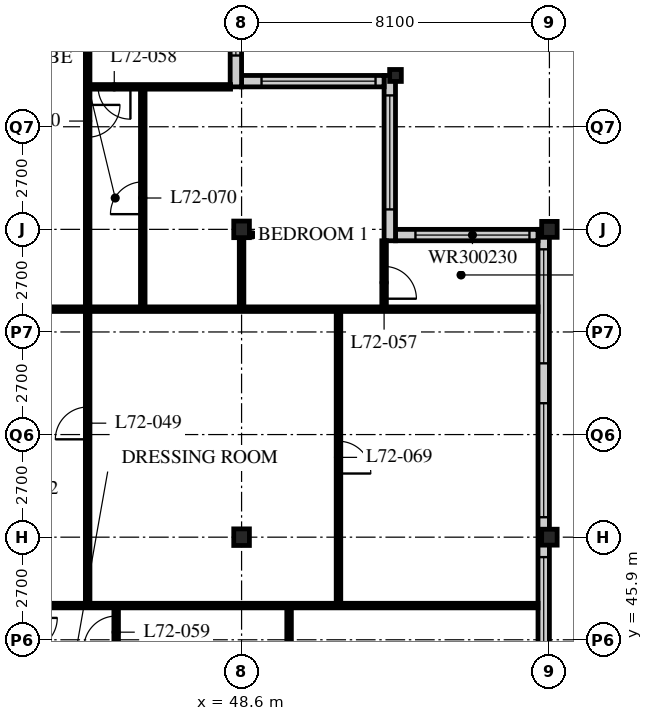
"""IFC4 building model, lengths in metres.
Left out: names, types, materials, properties, quantities, classifications, styles, units other than length and angle.
Written with IfcOpenShell. Run it as: python <this file> out.ifc"""

import sys

from ifc_helpers import new_model, si_unit, direction, frame, frame_2d, origin, origin_2d, place, context, subcontext, project, spatial, rectangle, i_section, extrude, element, fill, save


model = new_model("IFC4")
c1 = context("Model", 3, precision=1e-05, world=origin(), true_north=direction((0.0, 1.0)))
c2 = subcontext(c1, "Body", "Model", "MODEL_VIEW")
j1 = project(units=[si_unit("LENGTHUNIT", "METRE"), si_unit("PLANEANGLEUNIT", "RADIAN")], contexts=[c1])
p1 = place(None, origin())
s1 = spatial("IfcSite", under=j1, at=p1, CompositionType="ELEMENT")
p2 = place(p1, origin())
s2 = spatial("IfcBuilding", under=s1, at=p2, CompositionType="ELEMENT")
p3 = place(p2, frame((0.0, 0.0, 281.4)))
s3 = spatial("IfcBuildingStorey", under=s2, at=p3, CompositionType="ELEMENT", Elevation=281.4)
for number, where, z_axis, x_axis in (
    (1, (48.6, 48.6, 0.0), (0.0, 0.0, 1.0), (1.0, 0.0, 0.0)),
    (2, (48.6, 56.7, 0.0), (0.0, 0.0, 1.0), (1.0, 0.0, 0.0)),
):
    element("IfcColumn", number, at=place(p3, frame(where, z_axis=z_axis, x_axis=x_axis)), inside=s3, PredefinedType="COLUMN", context=c2, shape_type="SweptSolid", body=[
        extrude(i_section(OverallWidth=0.412, OverallDepth=0.437, WebThickness=0.036, FlangeThickness=0.058, FilletRadius=0.015, at=origin_2d()), origin(), (0.0, 0.0, 1.0), 3.9),
    ])
p4 = place(p3, frame((52.65, 60.75, 0.0), z_axis=(0.0, 0.0, 1.0), x_axis=(1.0, 0.0, 0.0)))
e3 = element("IfcColumn", 3, at=p4, inside=s3, PredefinedType="COLUMN", context=c2, shape_type="SweptSolid", body=[
    extrude(i_section(OverallWidth=0.307, OverallDepth=0.314, WebThickness=0.012, FlangeThickness=0.019, FilletRadius=0.015, at=origin_2d()), origin(), (0.0, 0.0, 1.0), 3.9),
])
for number, where, z_axis, x_axis in (
    (4, (56.7, 48.6, 0.0), (0.0, 0.0, 1.0), (1.0, 0.0, 0.0)),
    (5, (56.7, 56.7, 0.0), (0.0, 0.0, 1.0), (1.0, 0.0, 0.0)),
):
    element("IfcColumn", number, at=place(p3, frame(where, z_axis=z_axis, x_axis=x_axis)), inside=s3, PredefinedType="COLUMN", context=c2, shape_type="SweptSolid", body=[
        extrude(i_section(OverallWidth=0.407, OverallDepth=0.419, WebThickness=0.031, FlangeThickness=0.049, FilletRadius=0.015, at=origin_2d()), origin(), (0.0, 0.0, 1.0), 3.9),
    ])
p5 = place(p3, frame((56.55, 24.6, 0.0), z_axis=(0.0, 0.0, 1.0), x_axis=(0.0, 1.0, 0.0)))
e6 = element("IfcWall", 6, at=p5, inside=s3, PredefinedType="SOLIDWALL", context=c2, shape_type="SweptSolid", body=[
    extrude(rectangle(XDim=32.1, YDim=0.3, at=frame_2d((16.05, 0.0))), origin(), (0.0, 0.0, 1.0), 3.69),
])
p6 = place(p5, frame((0.225, 0.0, 0.6)))
e7 = element("IfcOpeningElement", 7, at=p6, cuts=e6, PredefinedType="OPENING", context=c2, shape_type="SweptSolid", body=[
    extrude(rectangle(XDim=3.0, YDim=2.4, at=frame_2d((1.5, 1.2))), frame((0.0, 0.16, 0.0), z_axis=(0.0, -1.0, 0.0), x_axis=(1.0, 0.0, 0.0)), (0.0, 0.0, 1.0), 0.32),
])
p7 = place(p5, frame((4.275, 0.0, 0.6)))
e8 = element("IfcOpeningElement", 8, at=p7, cuts=e6, PredefinedType="OPENING", context=c2, shape_type="SweptSolid", body=[
    extrude(rectangle(XDim=3.0, YDim=2.4, at=frame_2d((1.5, 1.2))), frame((0.0, 0.16, 0.0), z_axis=(0.0, -1.0, 0.0), x_axis=(1.0, 0.0, 0.0)), (0.0, 0.0, 1.0), 0.32),
])
p8 = place(p5, frame((8.325, 0.0, 0.6)))
e9 = element("IfcOpeningElement", 9, at=p8, cuts=e6, PredefinedType="OPENING", context=c2, shape_type="SweptSolid", body=[
    extrude(rectangle(XDim=3.0, YDim=2.4, at=frame_2d((1.5, 1.2))), frame((0.0, 0.16, 0.0), z_axis=(0.0, -1.0, 0.0), x_axis=(1.0, 0.0, 0.0)), (0.0, 0.0, 1.0), 0.32),
])
p9 = place(p5, frame((12.375, 0.0, 0.6)))
e10 = element("IfcOpeningElement", 10, at=p9, cuts=e6, PredefinedType="OPENING", context=c2, shape_type="SweptSolid", body=[
    extrude(rectangle(XDim=3.0, YDim=2.4, at=frame_2d((1.5, 1.2))), frame((0.0, 0.16, 0.0), z_axis=(0.0, -1.0, 0.0), x_axis=(1.0, 0.0, 0.0)), (0.0, 0.0, 1.0), 0.32),
])
p10 = place(p5, frame((16.425, 0.0, 0.6)))
e11 = element("IfcOpeningElement", 11, at=p10, cuts=e6, PredefinedType="OPENING", context=c2, shape_type="SweptSolid", body=[
    extrude(rectangle(XDim=3.0, YDim=2.4, at=frame_2d((1.5, 1.2))), frame((0.0, 0.16, 0.0), z_axis=(0.0, -1.0, 0.0), x_axis=(1.0, 0.0, 0.0)), (0.0, 0.0, 1.0), 0.32),
])
p11 = place(p5, frame((20.475, 0.0, 0.6)))
e12 = element("IfcOpeningElement", 12, at=p11, cuts=e6, PredefinedType="OPENING", context=c2, shape_type="SweptSolid", body=[
    extrude(rectangle(XDim=3.0, YDim=2.4, at=frame_2d((1.5, 1.2))), frame((0.0, 0.16, 0.0), z_axis=(0.0, -1.0, 0.0), x_axis=(1.0, 0.0, 0.0)), (0.0, 0.0, 1.0), 0.32),
])
p12 = place(p5, frame((24.525, 0.0, 0.6)))
e13 = element("IfcOpeningElement", 13, at=p12, cuts=e6, PredefinedType="OPENING", context=c2, shape_type="SweptSolid", body=[
    extrude(rectangle(XDim=3.0, YDim=2.4, at=frame_2d((1.5, 1.2))), frame((0.0, 0.16, 0.0), z_axis=(0.0, -1.0, 0.0), x_axis=(1.0, 0.0, 0.0)), (0.0, 0.0, 1.0), 0.32),
])
p13 = place(p5, frame((28.575, 0.0, 0.6)))
e14 = element("IfcOpeningElement", 14, at=p13, cuts=e6, PredefinedType="OPENING", context=c2, shape_type="SweptSolid", body=[
    extrude(rectangle(XDim=3.0, YDim=2.4, at=frame_2d((1.5, 1.2))), frame((0.0, 0.16, 0.0), z_axis=(0.0, -1.0, 0.0), x_axis=(1.0, 0.0, 0.0)), (0.0, 0.0, 1.0), 0.32),
])
p14 = place(p3, frame((56.4, 56.55, 0.0), z_axis=(0.0, 0.0, 1.0), x_axis=(-1.0, 0.0, 0.0)))
e15 = element("IfcWall", 15, at=p14, inside=s3, PredefinedType="SOLIDWALL", context=c2, shape_type="SweptSolid", body=[
    extrude(rectangle(XDim=3.75, YDim=0.3, at=frame_2d((1.875, 0.0))), origin(), (0.0, 0.0, 1.0), 3.69),
])
p15 = place(p14, frame((0.225, 0.0, 0.6)))
e16 = element("IfcOpeningElement", 16, at=p15, cuts=e15, PredefinedType="OPENING", context=c2, shape_type="SweptSolid", body=[
    extrude(rectangle(XDim=3.0, YDim=2.3, at=frame_2d((1.5, 1.15))), frame((0.0, 0.16, 0.0), z_axis=(0.0, -1.0, 0.0), x_axis=(1.0, 0.0, 0.0)), (0.0, 0.0, 1.0), 0.32),
])
p16 = place(p3, frame((52.5, 56.4, 0.0), z_axis=(0.0, 0.0, 1.0), x_axis=(0.0, 1.0, 0.0)))
e17 = element("IfcWall", 17, at=p16, inside=s3, PredefinedType="SOLIDWALL", context=c2, shape_type="SweptSolid", body=[
    extrude(rectangle(XDim=4.35, YDim=0.3, at=frame_2d((2.175, 0.0))), origin(), (0.0, 0.0, 1.0), 3.69),
])
p17 = place(p16, frame((0.825, 0.0, 0.6)))
e18 = element("IfcOpeningElement", 18, at=p17, cuts=e17, PredefinedType="OPENING", context=c2, shape_type="SweptSolid", body=[
    extrude(rectangle(XDim=3.0, YDim=2.3, at=frame_2d((1.5, 1.15))), frame((0.0, 0.16, 0.0), z_axis=(0.0, -1.0, 0.0), x_axis=(1.0, 0.0, 0.0)), (0.0, 0.0, 1.0), 0.32),
])
p18 = place(p3, frame((52.35, 60.6, 0.0), z_axis=(0.0, 0.0, 1.0), x_axis=(-1.0, 0.0, 0.0)))
e19 = element("IfcWall", 19, at=p18, inside=s3, PredefinedType="SOLIDWALL", context=c2, shape_type="SweptSolid", body=[
    extrude(rectangle(XDim=3.75, YDim=0.3, at=frame_2d((1.875, 0.0))), origin(), (0.0, 0.0, 1.0), 3.69),
])
p19 = place(p18, frame((0.225, 0.0, 0.6)))
e20 = element("IfcOpeningElement", 20, at=p19, cuts=e19, PredefinedType="OPENING", context=c2, shape_type="SweptSolid", body=[
    extrude(rectangle(XDim=3.0, YDim=2.3, at=frame_2d((1.5, 1.15))), frame((0.0, 0.16, 0.0), z_axis=(0.0, -1.0, 0.0), x_axis=(1.0, 0.0, 0.0)), (0.0, 0.0, 1.0), 0.32),
])
p20 = place(p3, frame((48.45, 60.45, 0.0), z_axis=(0.0, 0.0, 1.0), x_axis=(0.0, 1.0, 0.0)))
e21 = element("IfcWall", 21, at=p20, inside=s3, PredefinedType="SOLIDWALL", context=c2, shape_type="SweptSolid", body=[
    extrude(rectangle(XDim=4.35, YDim=0.3, at=frame_2d((2.175, 0.0))), origin(), (0.0, 0.0, 1.0), 3.69),
])
p21 = place(p20, frame((0.825, 0.0, 0.6)))
e22 = element("IfcOpeningElement", 22, at=p21, cuts=e21, PredefinedType="OPENING", context=c2, shape_type="SweptSolid", body=[
    extrude(rectangle(XDim=3.0, YDim=2.3, at=frame_2d((1.5, 1.15))), frame((0.0, 0.16, 0.0), z_axis=(0.0, -1.0, 0.0), x_axis=(1.0, 0.0, 0.0)), (0.0, 0.0, 1.0), 0.32),
])
p22 = place(p3, frame((42.9, 46.8, 0.0), z_axis=(0.0, 0.0, 1.0), x_axis=(1.0, 0.0, 0.0)))
e23 = element("IfcWall", 23, at=p22, inside=s3, PredefinedType="PARTITIONING", context=c2, shape_type="SweptSolid", body=[
    extrude(rectangle(XDim=13.5, YDim=0.12, at=frame_2d((6.75, 0.0))), origin(), (0.0, 0.0, 1.0), 3.69),
])
p23 = place(p3, frame((36.45, 54.6, 0.0), z_axis=(0.0, 0.0, 1.0), x_axis=(1.0, 0.0, 0.0)))
e24 = element("IfcWall", 24, at=p23, inside=s3, PredefinedType="PARTITIONING", context=c2, shape_type="SweptSolid", body=[
    extrude(rectangle(XDim=19.95, YDim=0.12, at=frame_2d((9.975, 0.0))), origin(), (0.0, 0.0, 1.0), 3.69),
])
p24 = place(p23, frame((1.675, 0.0, 0.0)))
e25 = element("IfcOpeningElement", 25, at=p24, cuts=e24, PredefinedType="OPENING", context=c2, shape_type="SweptSolid", body=[
    extrude(rectangle(XDim=0.85, YDim=2.1, at=frame_2d((0.425, 1.05))), frame((0.0, 0.07, 0.0), z_axis=(0.0, -1.0, 0.0), x_axis=(1.0, 0.0, 0.0)), (0.0, 0.0, 1.0), 0.14),
])
p25 = place(p3, frame((44.55, 64.5, 0.0), z_axis=(0.0, 0.0, 1.0), x_axis=(0.0, -1.0, 0.0)))
e26 = element("IfcWall", 26, at=p25, inside=s3, PredefinedType="PARTITIONING", context=c2, shape_type="SweptSolid", body=[
    extrude(rectangle(XDim=17.7, YDim=0.12, at=frame_2d((8.85, 0.0))), origin(), (0.0, 0.0, 1.0), 3.69),
])
p26 = place(p25, frame((12.475, 0.0, 0.0)))
e27 = element("IfcOpeningElement", 27, at=p26, cuts=e26, PredefinedType="OPENING", context=c2, shape_type="SweptSolid", body=[
    extrude(rectangle(XDim=0.85, YDim=2.1, at=frame_2d((0.425, 1.05))), frame((0.0, 0.07, 0.0), z_axis=(0.0, -1.0, 0.0), x_axis=(1.0, 0.0, 0.0)), (0.0, 0.0, 1.0), 0.14),
])
p27 = place(p25, frame((4.525, 0.0, 0.0)))
e28 = element("IfcOpeningElement", 28, at=p27, cuts=e26, PredefinedType="OPENING", context=c2, shape_type="SweptSolid", body=[
    extrude(rectangle(XDim=0.85, YDim=2.1, at=frame_2d((0.425, 1.05))), frame((0.0, 0.07, 0.0), z_axis=(0.0, -1.0, 0.0), x_axis=(1.0, 0.0, 0.0)), (0.0, 0.0, 1.0), 0.14),
])
p28 = place(p3, frame((52.35, 54.6, 0.0), z_axis=(0.0, 0.0, 1.0), x_axis=(0.0, 1.0, 0.0)))
e29 = element("IfcWall", 29, at=p28, inside=s3, PredefinedType="PARTITIONING", context=c2, shape_type="SweptSolid", body=[
    extrude(rectangle(XDim=1.8, YDim=0.12, at=frame_2d((0.9, 0.0))), origin(), (0.0, 0.0, 1.0), 3.69),
])
p29 = place(p28, frame((0.275, 0.0, 0.0)))
e30 = element("IfcOpeningElement", 30, at=p29, cuts=e29, PredefinedType="OPENING", context=c2, shape_type="SweptSolid", body=[
    extrude(rectangle(XDim=0.85, YDim=2.1, at=frame_2d((0.425, 1.05))), frame((0.0, 0.07, 0.0), z_axis=(0.0, -1.0, 0.0), x_axis=(1.0, 0.0, 0.0)), (0.0, 0.0, 1.0), 0.14),
])
p30 = place(p3, frame((48.31, 60.45, 0.0), z_axis=(0.0, 0.0, 1.0), x_axis=(-1.0, 0.0, 0.0)))
e31 = element("IfcWall", 31, at=p30, inside=s3, PredefinedType="PARTITIONING", context=c2, shape_type="SweptSolid", body=[
    extrude(rectangle(XDim=3.76, YDim=0.12, at=frame_2d((1.88, 0.0))), origin(), (0.0, 0.0, 1.0), 3.69),
])
p31 = place(p30, frame((2.635, 0.0, 0.0)))
e32 = element("IfcOpeningElement", 32, at=p31, cuts=e31, PredefinedType="OPENING", context=c2, shape_type="SweptSolid", body=[
    extrude(rectangle(XDim=0.85, YDim=2.1, at=frame_2d((0.425, 1.05))), frame((0.0, 0.07, 0.0), z_axis=(0.0, -1.0, 0.0), x_axis=(1.0, 0.0, 0.0)), (0.0, 0.0, 1.0), 0.14),
])
p32 = place(p3, frame((45.3, 46.8, 0.0), z_axis=(0.0, 0.0, 1.0), x_axis=(0.0, -1.0, 0.0)))
e33 = element("IfcWall", 33, at=p32, inside=s3, PredefinedType="PARTITIONING", context=c2, shape_type="SweptSolid", body=[
    extrude(rectangle(XDim=4.01, YDim=0.12, at=frame_2d((2.005, 0.0))), origin(), (0.0, 0.0, 1.0), 3.69),
])
p33 = place(p32, frame((0.275, 0.0, 0.0)))
e34 = element("IfcOpeningElement", 34, at=p33, cuts=e33, PredefinedType="OPENING", context=c2, shape_type="SweptSolid", body=[
    extrude(rectangle(XDim=0.85, YDim=2.1, at=frame_2d((0.425, 1.05))), frame((0.0, 0.07, 0.0), z_axis=(0.0, -1.0, 0.0), x_axis=(1.0, 0.0, 0.0)), (0.0, 0.0, 1.0), 0.14),
])
p34 = place(p3, frame((51.15, 46.8, 0.0), z_axis=(0.0, 0.0, 1.0), x_axis=(0.0, 1.0, 0.0)))
e35 = element("IfcWall", 35, at=p34, inside=s3, PredefinedType="PARTITIONING", context=c2, shape_type="SweptSolid", body=[
    extrude(rectangle(XDim=7.8, YDim=0.12, at=frame_2d((3.9, 0.0))), origin(), (0.0, 0.0, 1.0), 3.69),
])
p35 = place(p34, frame((3.475, 0.0, 0.0)))
e36 = element("IfcOpeningElement", 36, at=p35, cuts=e35, PredefinedType="OPENING", context=c2, shape_type="SweptSolid", body=[
    extrude(rectangle(XDim=0.85, YDim=2.1, at=frame_2d((0.425, 1.05))), frame((0.0, 0.07, 0.0), z_axis=(0.0, -1.0, 0.0), x_axis=(1.0, 0.0, 0.0)), (0.0, 0.0, 1.0), 0.14),
])
p36 = place(p3, frame((46.0, 54.6, 0.0), z_axis=(0.0, 0.0, 1.0), x_axis=(0.0, 1.0, 0.0)))
e37 = element("IfcWall", 37, at=p36, inside=s3, PredefinedType="PARTITIONING", context=c2, shape_type="SweptSolid", body=[
    extrude(rectangle(XDim=5.85, YDim=0.12, at=frame_2d((2.925, 0.0))), origin(), (0.0, 0.0, 1.0), 3.69),
])
p37 = place(p36, frame((2.5, 0.0, 0.0)))
e38 = element("IfcOpeningElement", 38, at=p37, cuts=e37, PredefinedType="OPENING", context=c2, shape_type="SweptSolid", body=[
    extrude(rectangle(XDim=0.85, YDim=2.1, at=frame_2d((0.425, 1.05))), frame((0.0, 0.07, 0.0), z_axis=(0.0, -1.0, 0.0), x_axis=(1.0, 0.0, 0.0)), (0.0, 0.0, 1.0), 0.14),
])
p38 = place(p3, frame((49.85, 40.5, 0.0), z_axis=(0.0, 0.0, 1.0), x_axis=(0.0, 1.0, 0.0)))
e39 = element("IfcWall", 39, at=p38, inside=s3, PredefinedType="PARTITIONING", context=c2, shape_type="SweptSolid", body=[
    extrude(rectangle(XDim=6.3, YDim=0.12, at=frame_2d((3.15, 0.0))), origin(), (0.0, 0.0, 1.0), 3.69),
])
p39 = place(p38, frame((2.725, 0.0, 0.0)))
e40 = element("IfcOpeningElement", 40, at=p39, cuts=e39, PredefinedType="OPENING", context=c2, shape_type="SweptSolid", body=[
    extrude(rectangle(XDim=0.85, YDim=2.1, at=frame_2d((0.425, 1.05))), frame((0.0, 0.07, 0.0), z_axis=(0.0, -1.0, 0.0), x_axis=(1.0, 0.0, 0.0)), (0.0, 0.0, 1.0), 0.14),
])
p40 = place(p3, frame((48.6, 54.6, 0.0), z_axis=(0.0, 0.0, 1.0), x_axis=(0.0, 1.0, 0.0)))
e41 = element("IfcWall", 41, at=p40, inside=s3, PredefinedType="PARTITIONING", context=c2, shape_type="SweptSolid", body=[
    extrude(rectangle(XDim=1.897, YDim=0.12, at=frame_2d((0.948, 0.0))), origin(), (0.0, 0.0, 1.0), 3.078),
])
p41 = place(p11, origin())
e42 = element("IfcWindow", 42, at=p41, inside=s3, PartitioningType="SINGLE_PANEL", PredefinedType="WINDOW", context=c2, shape_type="SweptSolid", body=[
    extrude(rectangle(XDim=3.0, YDim=2.4, at=frame_2d((1.5, 1.2))), frame((0.0, 0.03, 0.0), z_axis=(0.0, -1.0, 0.0), x_axis=(1.0, 0.0, 0.0)), (0.0, 0.0, 1.0), 0.06),
])
fill(e12, e42)
p42 = place(p12, origin())
e43 = element("IfcWindow", 43, at=p42, inside=s3, PartitioningType="SINGLE_PANEL", PredefinedType="WINDOW", context=c2, shape_type="SweptSolid", body=[
    extrude(rectangle(XDim=3.0, YDim=2.4, at=frame_2d((1.5, 1.2))), frame((0.0, 0.03, 0.0), z_axis=(0.0, -1.0, 0.0), x_axis=(1.0, 0.0, 0.0)), (0.0, 0.0, 1.0), 0.06),
])
fill(e13, e43)
p43 = place(p13, origin())
e44 = element("IfcWindow", 44, at=p43, inside=s3, PartitioningType="SINGLE_PANEL", PredefinedType="WINDOW", context=c2, shape_type="SweptSolid", body=[
    extrude(rectangle(XDim=3.0, YDim=2.4, at=frame_2d((1.5, 1.2))), frame((0.0, 0.03, 0.0), z_axis=(0.0, -1.0, 0.0), x_axis=(1.0, 0.0, 0.0)), (0.0, 0.0, 1.0), 0.06),
])
fill(e14, e44)
p44 = place(p15, origin())
e45 = element("IfcWindow", 45, at=p44, inside=s3, PartitioningType="SINGLE_PANEL", PredefinedType="WINDOW", context=c2, shape_type="SweptSolid", body=[
    extrude(rectangle(XDim=3.0, YDim=2.3, at=frame_2d((1.5, 1.15))), frame((0.0, 0.03, 0.0), z_axis=(0.0, -1.0, 0.0), x_axis=(1.0, 0.0, 0.0)), (0.0, 0.0, 1.0), 0.06),
])
fill(e16, e45)
p45 = place(p17, origin())
e46 = element("IfcWindow", 46, at=p45, inside=s3, PartitioningType="SINGLE_PANEL", PredefinedType="WINDOW", context=c2, shape_type="SweptSolid", body=[
    extrude(rectangle(XDim=3.0, YDim=2.3, at=frame_2d((1.5, 1.15))), frame((0.0, 0.03, 0.0), z_axis=(0.0, -1.0, 0.0), x_axis=(1.0, 0.0, 0.0)), (0.0, 0.0, 1.0), 0.06),
])
fill(e18, e46)
p46 = place(p19, origin())
e47 = element("IfcWindow", 47, at=p46, inside=s3, PartitioningType="SINGLE_PANEL", PredefinedType="WINDOW", context=c2, shape_type="SweptSolid", body=[
    extrude(rectangle(XDim=3.0, YDim=2.3, at=frame_2d((1.5, 1.15))), frame((0.0, 0.03, 0.0), z_axis=(0.0, -1.0, 0.0), x_axis=(1.0, 0.0, 0.0)), (0.0, 0.0, 1.0), 0.06),
])
fill(e20, e47)
p47 = place(p21, origin())
e48 = element("IfcWindow", 48, at=p47, inside=s3, PartitioningType="SINGLE_PANEL", PredefinedType="WINDOW", context=c2, shape_type="SweptSolid", body=[
    extrude(rectangle(XDim=3.0, YDim=2.3, at=frame_2d((1.5, 1.15))), frame((0.0, 0.03, 0.0), z_axis=(0.0, -1.0, 0.0), x_axis=(1.0, 0.0, 0.0)), (0.0, 0.0, 1.0), 0.06),
])
fill(e22, e48)
p48 = place(p26, origin())
e49 = element("IfcDoor", 49, at=p48, inside=s3, OperationType="SINGLE_SWING_LEFT", PredefinedType="DOOR", context=c2, shape_type="SweptSolid", body=[
    extrude(rectangle(XDim=0.85, YDim=2.1, at=frame_2d((0.425, 1.05))), frame((0.0, 0.025, 0.0), z_axis=(0.0, -1.0, 0.0), x_axis=(1.0, 0.0, 0.0)), (0.0, 0.0, 1.0), 0.05),
])
fill(e27, e49)
p49 = place(p27, origin())
e50 = element("IfcDoor", 50, at=p49, inside=s3, OperationType="SINGLE_SWING_LEFT", PredefinedType="DOOR", context=c2, shape_type="SweptSolid", body=[
    extrude(rectangle(XDim=0.85, YDim=2.1, at=frame_2d((0.425, 1.05))), frame((0.0, 0.025, 0.0), z_axis=(0.0, -1.0, 0.0), x_axis=(1.0, 0.0, 0.0)), (0.0, 0.0, 1.0), 0.05),
])
fill(e28, e50)
p50 = place(p29, origin())
e51 = element("IfcDoor", 51, at=p50, inside=s3, OperationType="SINGLE_SWING_RIGHT", PredefinedType="DOOR", context=c2, shape_type="SweptSolid", body=[
    extrude(rectangle(XDim=0.85, YDim=2.1, at=frame_2d((0.425, 1.05))), frame((0.0, 0.025, 0.0), z_axis=(0.0, -1.0, 0.0), x_axis=(1.0, 0.0, 0.0)), (0.0, 0.0, 1.0), 0.05),
])
fill(e30, e51)
p51 = place(p31, origin())
e52 = element("IfcDoor", 52, at=p51, inside=s3, OperationType="SINGLE_SWING_LEFT", PredefinedType="DOOR", context=c2, shape_type="SweptSolid", body=[
    extrude(rectangle(XDim=0.85, YDim=2.1, at=frame_2d((0.425, 1.05))), frame((0.0, 0.025, 0.0), z_axis=(0.0, -1.0, 0.0), x_axis=(1.0, 0.0, 0.0)), (0.0, 0.0, 1.0), 0.05),
])
fill(e32, e52)
p52 = place(p33, origin())
e53 = element("IfcDoor", 53, at=p52, inside=s3, OperationType="SINGLE_SWING_LEFT", PredefinedType="DOOR", context=c2, shape_type="SweptSolid", body=[
    extrude(rectangle(XDim=0.85, YDim=2.1, at=frame_2d((0.425, 1.05))), frame((0.0, 0.025, 0.0), z_axis=(0.0, -1.0, 0.0), x_axis=(1.0, 0.0, 0.0)), (0.0, 0.0, 1.0), 0.05),
])
fill(e34, e53)
p53 = place(p35, origin())
e54 = element("IfcDoor", 54, at=p53, inside=s3, OperationType="SINGLE_SWING_RIGHT", PredefinedType="DOOR", context=c2, shape_type="SweptSolid", body=[
    extrude(rectangle(XDim=0.85, YDim=2.1, at=frame_2d((0.425, 1.05))), frame((0.0, 0.025, 0.0), z_axis=(0.0, -1.0, 0.0), x_axis=(1.0, 0.0, 0.0)), (0.0, 0.0, 1.0), 0.05),
])
fill(e36, e54)
p54 = place(p37, origin())
e55 = element("IfcDoor", 55, at=p54, inside=s3, OperationType="SINGLE_SWING_LEFT", PredefinedType="DOOR", context=c2, shape_type="SweptSolid", body=[
    extrude(rectangle(XDim=0.85, YDim=2.1, at=frame_2d((0.425, 1.05))), frame((0.0, 0.025, 0.0), z_axis=(0.0, -1.0, 0.0), x_axis=(1.0, 0.0, 0.0)), (0.0, 0.0, 1.0), 0.05),
])
fill(e38, e55)
save(model, sys.argv[1])
